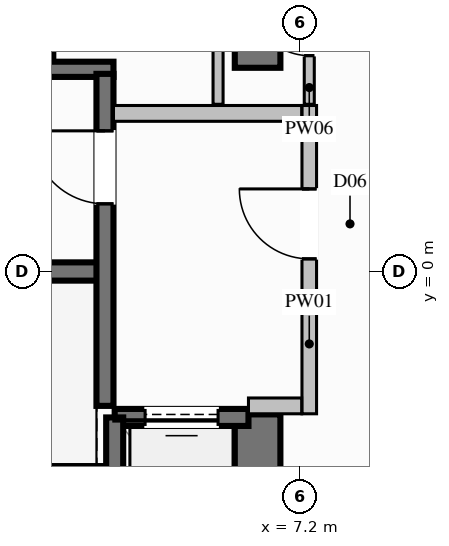
"""IFC4 building model, lengths in metres.
Left out: names, types, materials, properties, quantities, classifications, styles, units other than length and angle.
Written with IfcOpenShell. Run it as: python <this file> out.ifc"""

import sys

from ifc_helpers import new_model, si_unit, direction, frame, frame_2d, origin, place, context, subcontext, project, spatial, rectangle, extrude, element, fill, save


model = new_model("IFC4")
c1 = context("Model", 3, precision=1e-05, world=origin(), true_north=direction((0.0, 1.0)))
c2 = subcontext(c1, "Body", "Model", "MODEL_VIEW")
j1 = project(units=[si_unit("LENGTHUNIT", "METRE"), si_unit("PLANEANGLEUNIT", "RADIAN")], contexts=[c1])
p1 = place(None, origin())
s1 = spatial("IfcSite", under=j1, at=p1, CompositionType="ELEMENT")
p2 = place(p1, origin())
s2 = spatial("IfcBuilding", under=s1, at=p2, CompositionType="ELEMENT")
p3 = place(p2, frame((0.0, 0.0, 53.6)))
s3 = spatial("IfcBuildingStorey", under=s2, at=p3, CompositionType="ELEMENT", Elevation=53.6)
p4 = place(p3, frame((-3.99, 0.0, 0.0), z_axis=(0.0, 0.0, 1.0), x_axis=(1.0, 0.0, 0.0)))
e1 = element("IfcWall", 1, at=p4, inside=s3, PredefinedType="SHEAR", context=c2, shape_type="SweptSolid", body=[
    extrude(rectangle(XDim=7.98, YDim=0.3, at=frame_2d((3.99, 0.0))), origin(), (0.0, 0.0, 1.0), 3.6),
])
for number, where, z_axis, x_axis in (
    (2, (-4.13, -3.325, 0.0), (0.0, 0.0, 1.0), (1.0, 0.0, 0.0)),
    (3, (-4.13, 3.325, 0.0), (0.0, 0.0, 1.0), (1.0, 0.0, 0.0)),
):
    element("IfcWall", number, at=place(p3, frame(where, z_axis=z_axis, x_axis=x_axis)), inside=s3, PredefinedType="SOLIDWALL", context=c2, shape_type="SweptSolid", body=[
        extrude(rectangle(XDim=8.26, YDim=0.25, at=frame_2d((4.13, 0.0))), origin(), (0.0, 0.0, 1.0), 3.6),
    ])
p5 = place(p3, frame((6.5, -6.475, 0.0), z_axis=(0.0, 0.0, 1.0), x_axis=(0.0, 1.0, 0.0)))
e4 = element("IfcWall", 4, at=p5, inside=s3, PredefinedType="SHEAR", context=c2, shape_type="SweptSolid", body=[
    extrude(rectangle(XDim=4.125, YDim=0.75, at=frame_2d((2.062, 0.0))), origin(), (0.0, 0.0, 1.0), 3.6),
])
p6 = place(p3, frame((6.5, 3.35, 0.0), z_axis=(0.0, 0.0, 1.0), x_axis=(0.0, 1.0, 0.0)))
e5 = element("IfcWall", 5, at=p6, inside=s3, PredefinedType="SHEAR", context=c2, shape_type="SweptSolid", body=[
    extrude(rectangle(XDim=3.125, YDim=0.75, at=frame_2d((1.562, 0.0))), origin(), (0.0, 0.0, 1.0), 3.6),
])
p7 = place(p3, frame((3.0, 3.5, 0.0), z_axis=(0.0, 0.0, 1.0), x_axis=(0.0, 1.0, 0.0)))
e6 = element("IfcWall", 6, at=p7, inside=s3, PredefinedType="SOLIDWALL", context=c2, shape_type="SweptSolid", body=[
    extrude(rectangle(XDim=2.5, YDim=0.28, at=frame_2d((1.25, 0.0))), origin(), (0.0, 0.0, 1.0), 3.34),
])
p8 = place(p3, frame((6.35, -2.4, 0.0), z_axis=(0.0, 0.0, 1.0), x_axis=(-1.0, 0.0, 0.0)))
e7 = element("IfcWall", 7, at=p8, inside=s3, PredefinedType="SOLIDWALL", context=c2, shape_type="SweptSolid", body=[
    extrude(rectangle(XDim=2.2, YDim=0.28, at=frame_2d((1.1, 0.0))), origin(), (0.0, 0.0, 1.0), 3.34),
])
p9 = place(p8, frame((0.5, 0.0, 0.0)))
e8 = element("IfcOpeningElement", 8, at=p9, cuts=e7, PredefinedType="OPENING", context=c2, shape_type="SweptSolid", body=[
    extrude(rectangle(XDim=1.2, YDim=2.2, at=frame_2d((0.6, 1.1))), frame((0.0, 0.15, 0.0), z_axis=(0.0, -1.0, 0.0), x_axis=(1.0, 0.0, 0.0)), (0.0, 0.0, 1.0), 0.3),
])
p10 = place(p3, frame((4.15, -2.4, 0.0), z_axis=(0.0, 0.0, 1.0), x_axis=(0.0, -1.0, 0.0)))
e9 = element("IfcWall", 9, at=p10, inside=s3, PredefinedType="SOLIDWALL", context=c2, shape_type="SweptSolid", body=[
    extrude(rectangle(XDim=2.7, YDim=0.28, at=frame_2d((1.35, 0.0))), origin(), (0.0, 0.0, 1.0), 3.34),
])
p11 = place(p3, frame((3.99, -2.21, 0.0), z_axis=(0.0, 0.0, 1.0), x_axis=(0.0, 1.0, 0.0)))
e10 = element("IfcWall", 10, at=p11, inside=s3, PredefinedType="SOLIDWALL", context=c2, shape_type="SweptSolid", body=[
    extrude(rectangle(XDim=5.46, YDim=0.28, at=frame_2d((2.73, 0.0))), origin(), (0.0, 0.0, 1.0), 3.34),
])
p12 = place(p11, frame((3.323, 0.0, 0.0)))
e11 = element("IfcOpeningElement", 11, at=p12, cuts=e10, PredefinedType="OPENING", context=c2, shape_type="SweptSolid", body=[
    extrude(rectangle(XDim=1.2, YDim=2.2, at=frame_2d((0.6, 1.1))), frame((0.0, 0.15, 0.0), z_axis=(0.0, -1.0, 0.0), x_axis=(1.0, 0.0, 0.0)), (0.0, 0.0, 1.0), 0.3),
])
p13 = place(p3, frame((7.35, -2.34, 0.0), z_axis=(0.0, 0.0, 1.0), x_axis=(0.0, 1.0, 0.0)))
e12 = element("IfcWall", 12, at=p13, inside=s3, PredefinedType="PARTITIONING", context=c2, shape_type="SweptSolid", body=[
    extrude(rectangle(XDim=5.07, YDim=0.24, at=frame_2d((2.535, 0.0))), origin(), (0.0, 0.0, 1.0), 2.425),
])
p14 = place(p13, frame((2.548, 0.0, 0.0)))
e13 = element("IfcOpeningElement", 13, at=p14, cuts=e12, PredefinedType="OPENING", context=c2, shape_type="SweptSolid", body=[
    extrude(rectangle(XDim=1.15, YDim=2.2, at=frame_2d((0.575, 1.1))), frame((0.0, 0.13, 0.0), z_axis=(0.0, -1.0, 0.0), x_axis=(1.0, 0.0, 0.0)), (0.0, 0.0, 1.0), 0.26),
])
p15 = place(p3, frame((6.35, -2.21, 0.0), z_axis=(0.0, 0.0, 1.0), x_axis=(1.0, 0.0, 0.0)))
e14 = element("IfcWall", 14, at=p15, inside=s3, PredefinedType="PARTITIONING", context=c2, shape_type="SweptSolid", body=[
    extrude(rectangle(XDim=0.875, YDim=0.26, at=frame_2d((0.438, 0.0))), origin(), (0.0, 0.0, 1.0), 3.34),
])
p16 = place(p3, frame((4.13, 2.6, 0.0), z_axis=(0.0, 0.0, 1.0), x_axis=(1.0, 0.0, 0.0)))
e15 = element("IfcWall", 15, at=p16, inside=s3, PredefinedType="PARTITIONING", context=c2, shape_type="SweptSolid", body=[
    extrude(rectangle(XDim=3.095, YDim=0.26, at=frame_2d((1.548, 0.0))), origin(), (0.0, 0.0, 1.0), 3.34),
])
p17 = place(p3, frame((7.35, 2.75, 0.0), z_axis=(0.0, 0.0, 1.0), x_axis=(0.0, 1.0, 0.0)))
e16 = element("IfcWall", 16, at=p17, inside=s3, PredefinedType="PARTITIONING", context=c2, shape_type="SweptSolid", body=[
    extrude(rectangle(XDim=2.55, YDim=0.165, at=frame_2d((1.275, 0.0))), origin(), (0.0, 0.0, 1.0), 3.34),
])
p18 = place(p17, frame((0.8, 0.0, 0.0)))
e17 = element("IfcOpeningElement", 17, at=p18, cuts=e16, PredefinedType="OPENING", context=c2, shape_type="SweptSolid", body=[
    extrude(rectangle(XDim=0.95, YDim=2.1, at=frame_2d((0.475, 1.05))), frame((0.0, 0.093, 0.0), z_axis=(0.0, -1.0, 0.0), x_axis=(1.0, 0.0, 0.0)), (0.0, 0.0, 1.0), 0.185),
])
p19 = place(p3, frame((5.85, 5.3, 0.0), z_axis=(0.0, 0.0, 1.0), x_axis=(0.0, -1.0, 0.0)))
e18 = element("IfcWall", 18, at=p19, inside=s3, PredefinedType="PARTITIONING", context=c2, shape_type="SweptSolid", body=[
    extrude(rectangle(XDim=2.55, YDim=0.165, at=frame_2d((1.275, 0.0))), origin(), (0.0, 0.0, 1.0), 2.425),
])
p20 = place(p9, origin())
e19 = element("IfcDoor", 19, at=p20, inside=s3, OperationType="SLIDING_TO_LEFT", PredefinedType="DOOR", context=c2, shape_type="SweptSolid", body=[
    extrude(rectangle(XDim=1.2, YDim=2.2, at=frame_2d((0.6, 1.1))), frame((0.0, 0.025, 0.0), z_axis=(0.0, -1.0, 0.0), x_axis=(1.0, 0.0, 0.0)), (0.0, 0.0, 1.0), 0.05),
])
fill(e8, e19)
p21 = place(p12, origin())
e20 = element("IfcDoor", 20, at=p21, inside=s3, OperationType="SINGLE_SWING_RIGHT", PredefinedType="DOOR", context=c2, shape_type="SweptSolid", body=[
    extrude(rectangle(XDim=1.2, YDim=2.2, at=frame_2d((0.6, 1.1))), frame((0.0, 0.025, 0.0), z_axis=(0.0, -1.0, 0.0), x_axis=(1.0, 0.0, 0.0)), (0.0, 0.0, 1.0), 0.05),
])
fill(e11, e20)
p22 = place(p14, origin())
e21 = element("IfcDoor", 21, at=p22, inside=s3, OperationType="SINGLE_SWING_RIGHT", PredefinedType="DOOR", context=c2, shape_type="SweptSolid", body=[
    extrude(rectangle(XDim=1.15, YDim=2.2, at=frame_2d((0.575, 1.1))), frame((0.0, 0.025, 0.0), z_axis=(0.0, -1.0, 0.0), x_axis=(1.0, 0.0, 0.0)), (0.0, 0.0, 1.0), 0.05),
])
fill(e13, e21)
p23 = place(p18, origin())
e22 = element("IfcDoor", 22, at=p23, inside=s3, OperationType="SINGLE_SWING_RIGHT", PredefinedType="DOOR", context=c2, shape_type="SweptSolid", body=[
    extrude(rectangle(XDim=0.95, YDim=2.1, at=frame_2d((0.475, 1.05))), frame((0.0, 0.025, 0.0), z_axis=(0.0, -1.0, 0.0), x_axis=(1.0, 0.0, 0.0)), (0.0, 0.0, 1.0), 0.05),
])
fill(e17, e22)
save(model, sys.argv[1])
